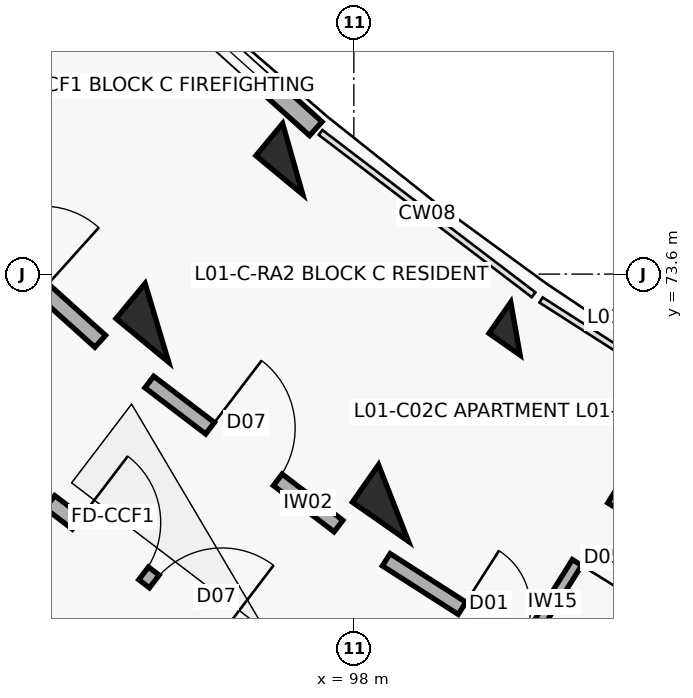
"""IFC4 building model, lengths in metres.
Left out: names, types, materials, properties, quantities, classifications, styles, units other than length and angle.
Written with IfcOpenShell. Run it as: python <this file> out.ifc"""

import sys

from ifc_helpers import new_model, si_unit, direction, frame, frame_2d, origin, origin_2d, place, context, subcontext, project, spatial, rectangle, extrude, element, fill, save


model = new_model("IFC4")
c1 = context("Model", 3, precision=1e-05, world=origin(), true_north=direction((0.0, 1.0)))
c2 = subcontext(c1, "Body", "Model", "MODEL_VIEW")
j1 = project(units=[si_unit("LENGTHUNIT", "METRE"), si_unit("PLANEANGLEUNIT", "RADIAN")], contexts=[c1])
p1 = place(None, origin())
s1 = spatial("IfcSite", under=j1, at=p1, CompositionType="ELEMENT")
p2 = place(p1, origin())
s2 = spatial("IfcBuilding", under=s1, at=p2, CompositionType="ELEMENT")
p3 = place(p2, frame((0.0, 0.0, 4.5)))
s3 = spatial("IfcBuildingStorey", under=s2, at=p3, CompositionType="ELEMENT", Elevation=4.5)
p4 = place(p3, frame((97.195, 75.115, 0.0), z_axis=(0.0, 0.0, 1.0), x_axis=(-0.637961754089, -0.770068049148, 0.0)))
e1 = element("IfcColumn", 1, at=p4, inside=s3, PredefinedType="COLUMN", context=c2, shape_type="SweptSolid", body=[
    extrude(rectangle(XDim=0.55, YDim=0.8, at=origin_2d()), origin(), (0.0, 0.0, 1.0), 3.6),
])
p5 = place(p3, frame((95.409, 72.958, 0.0), z_axis=(0.0, 0.0, 1.0), x_axis=(-0.637961754089, -0.770068049148, 0.0)))
e2 = element("IfcColumn", 2, at=p5, inside=s3, PredefinedType="COLUMN", context=c2, shape_type="SweptSolid", body=[
    extrude(rectangle(XDim=0.6, YDim=0.9, at=origin_2d()), origin(), (0.0, 0.0, 1.0), 3.6),
])
p6 = place(p3, frame((100.126, 72.882, 0.0), z_axis=(0.0, 0.0, 1.0), x_axis=(-0.573004420611, -0.819552276527, 0.0)))
e3 = element("IfcColumn", 3, at=p6, inside=s3, PredefinedType="COLUMN", context=c2, shape_type="SweptSolid", body=[
    extrude(rectangle(XDim=0.5, YDim=0.5, at=origin_2d()), origin(), (0.0, 0.0, 1.0), 3.6),
])
p7 = place(p3, frame((98.522, 70.587, 0.0), z_axis=(0.0, 0.0, 1.0), x_axis=(-0.573004420611, -0.819552276527, 0.0)))
e4 = element("IfcColumn", 4, at=p7, inside=s3, PredefinedType="COLUMN", context=c2, shape_type="SweptSolid", body=[
    extrude(rectangle(XDim=0.6, YDim=0.9, at=origin_2d()), origin(), (0.0, 0.0, 1.0), 3.6),
])
p8 = place(p3, frame((94.82, 77.923, 0.0), z_axis=(0.0, 0.0, 1.0), x_axis=(0.743385092197, -0.668863666751, 0.0)))
e5 = element("IfcWall", 5, at=p8, inside=s3, PredefinedType="SOLIDWALL", context=c2, shape_type="SweptSolid", body=[
    extrude(rectangle(XDim=3.604, YDim=0.245, at=frame_2d((1.802, 0.0))), origin(), (0.0, 0.0, 1.0), 2.6),
])
p9 = place(p8, frame((0.752, 0.0, 0.32)))
e6 = element("IfcOpeningElement", 6, at=p9, cuts=e5, PredefinedType="OPENING", context=c2, shape_type="SweptSolid", body=[
    extrude(rectangle(XDim=2.1, YDim=1.65, at=frame_2d((1.05, 0.825))), frame((0.0, 0.133, 0.0), z_axis=(0.0, -1.0, 0.0), x_axis=(1.0, 0.0, 0.0)), (0.0, 0.0, 1.0), 0.265),
])
p10 = place(p3, frame((92.337, 74.808, 0.0), z_axis=(0.0, 0.0, 1.0), x_axis=(0.743348465558, -0.668904371904, 0.0)))
e7 = element("IfcWall", 7, at=p10, inside=s3, PredefinedType="SOLIDWALL", context=c2, shape_type="SweptSolid", body=[
    extrude(rectangle(XDim=3.129, YDim=0.21, at=frame_2d((1.564, 0.0))), origin(), (0.0, 0.0, 1.0), 2.58),
])
p11 = place(p10, frame((1.014, 0.0, 0.0)))
e8 = element("IfcOpeningElement", 8, at=p11, cuts=e7, PredefinedType="OPENING", context=c2, shape_type="SweptSolid", body=[
    extrude(rectangle(XDim=1.1, YDim=2.15, at=frame_2d((0.55, 1.075))), frame((0.0, 0.115, 0.0), z_axis=(0.0, -1.0, 0.0), x_axis=(1.0, 0.0, 0.0)), (0.0, 0.0, 1.0), 0.23),
])
p12 = place(p3, frame((94.001, 70.602, 0.0), z_axis=(0.0, 0.0, 1.0), x_axis=(0.795498026433, -0.605956178235, 0.0)))
e9 = element("IfcWall", 9, at=p12, inside=s3, PredefinedType="SOLIDWALL", context=c2, shape_type="SweptSolid", body=[
    extrude(rectangle(XDim=3.296, YDim=0.21, at=frame_2d((1.648, 0.0))), origin(), (0.0, 0.0, 1.0), 2.58),
])
p13 = place(p12, frame((0.45, 0.0, 0.0)))
e10 = element("IfcOpeningElement", 10, at=p13, cuts=e9, PredefinedType="OPENING", context=c2, shape_type="SweptSolid", body=[
    extrude(rectangle(XDim=1.1, YDim=2.15, at=frame_2d((0.55, 1.075))), frame((0.0, 0.115, 0.0), z_axis=(0.0, -1.0, 0.0), x_axis=(1.0, 0.0, 0.0)), (0.0, 0.0, 1.0), 0.23),
])
p14 = place(p12, frame((1.726, 0.0, 0.0)))
e11 = element("IfcOpeningElement", 11, at=p14, cuts=e9, PredefinedType="OPENING", context=c2, shape_type="SweptSolid", body=[
    extrude(rectangle(XDim=1.12, YDim=2.15, at=frame_2d((0.56, 1.075))), frame((0.0, 0.115, 0.0), z_axis=(0.0, -1.0, 0.0), x_axis=(1.0, 0.0, 0.0)), (0.0, 0.0, 1.0), 0.23),
])
p15 = place(p3, frame((95.309, 72.18, 0.0), z_axis=(0.0, 0.0, 1.0), x_axis=(0.795463961918, -0.606000895453, 0.0)))
e12 = element("IfcWall", 12, at=p15, inside=s3, PredefinedType="SOLIDWALL", context=c2, shape_type="SweptSolid", body=[
    extrude(rectangle(XDim=3.129, YDim=0.19, at=frame_2d((1.564, 0.0))), origin(), (0.0, 0.0, 1.0), 2.58),
])
p16 = place(p15, frame((1.004, 0.0, 0.0)))
e13 = element("IfcOpeningElement", 13, at=p16, cuts=e12, PredefinedType="OPENING", context=c2, shape_type="SweptSolid", body=[
    extrude(rectangle(XDim=1.12, YDim=2.15, at=frame_2d((0.56, 1.075))), frame((0.0, 0.105, 0.0), z_axis=(0.0, -1.0, 0.0), x_axis=(1.0, 0.0, 0.0)), (0.0, 0.0, 1.0), 0.21),
])
p17 = place(p3, frame((98.427, 69.841, 0.0), z_axis=(0.0, 0.0, 1.0), x_axis=(0.842280895761, -0.539038860043, 0.0)))
e14 = element("IfcWall", 14, at=p17, inside=s3, PredefinedType="SOLIDWALL", context=c2, shape_type="SweptSolid", body=[
    extrude(rectangle(XDim=3.269, YDim=0.19, at=frame_2d((1.634, 0.0))), origin(), (0.0, 0.0, 1.0), 2.58),
])
p18 = place(p17, frame((1.184, 0.0, 0.0)))
e15 = element("IfcOpeningElement", 15, at=p18, cuts=e14, PredefinedType="OPENING", context=c2, shape_type="SweptSolid", body=[
    extrude(rectangle(XDim=0.9, YDim=2.1, at=frame_2d((0.45, 1.05))), frame((0.0, 0.105, 0.0), z_axis=(0.0, -1.0, 0.0), x_axis=(1.0, 0.0, 0.0)), (0.0, 0.0, 1.0), 0.21),
])
p19 = place(p3, frame((102.044, 71.577, 0.0), z_axis=(0.0, 0.0, 1.0), x_axis=(-0.53015188203, -0.847902696057, 0.0)))
e16 = element("IfcWall", 16, at=p19, inside=s3, PredefinedType="PARTITIONING", context=c2, shape_type="SweptSolid", body=[
    extrude(rectangle(XDim=3.3, YDim=0.145, at=frame_2d((1.65, 0.0))), origin(), (0.0, 0.0, 1.0), 2.58),
])
p20 = place(p19, frame((1.21, 0.0, 0.0)))
e17 = element("IfcOpeningElement", 17, at=p20, cuts=e16, PredefinedType="OPENING", context=c2, shape_type="SweptSolid", body=[
    extrude(rectangle(XDim=0.88, YDim=2.1, at=frame_2d((0.44, 1.05))), frame((0.0, 0.083, 0.0), z_axis=(0.0, -1.0, 0.0), x_axis=(1.0, 0.0, 0.0)), (0.0, 0.0, 1.0), 0.165),
])
p21 = place(p9, origin())
e18 = element("IfcWindow", 18, at=p21, inside=s3, PartitioningType="TRIPLE_PANEL_VERTICAL", PredefinedType="WINDOW", context=c2, shape_type="SweptSolid", body=[
    extrude(rectangle(XDim=2.1, YDim=1.65, at=frame_2d((1.05, 0.825))), frame((0.0, 0.03, 0.0), z_axis=(0.0, -1.0, 0.0), x_axis=(1.0, 0.0, 0.0)), (0.0, 0.0, 1.0), 0.06),
])
fill(e6, e18)
p22 = place(p13, origin())
e19 = element("IfcDoor", 19, at=p22, inside=s3, OperationType="SINGLE_SWING_LEFT", PredefinedType="DOOR", context=c2, shape_type="SweptSolid", body=[
    extrude(rectangle(XDim=1.1, YDim=2.15, at=frame_2d((0.55, 1.075))), frame((0.0, 0.025, 0.0), z_axis=(0.0, -1.0, 0.0), x_axis=(1.0, 0.0, 0.0)), (0.0, 0.0, 1.0), 0.05),
])
fill(e10, e19)
p23 = place(p14, origin())
e20 = element("IfcDoor", 20, at=p23, inside=s3, OperationType="SINGLE_SWING_RIGHT", PredefinedType="DOOR", context=c2, shape_type="SweptSolid", body=[
    extrude(rectangle(XDim=1.12, YDim=2.15, at=frame_2d((0.56, 1.075))), frame((0.0, 0.025, 0.0), z_axis=(0.0, -1.0, 0.0), x_axis=(1.0, 0.0, 0.0)), (0.0, 0.0, 1.0), 0.05),
])
fill(e11, e20)
p24 = place(p16, origin())
e21 = element("IfcDoor", 21, at=p24, inside=s3, OperationType="SINGLE_SWING_LEFT", PredefinedType="DOOR", context=c2, shape_type="SweptSolid", body=[
    extrude(rectangle(XDim=1.12, YDim=2.15, at=frame_2d((0.56, 1.075))), frame((0.0, 0.025, 0.0), z_axis=(0.0, -1.0, 0.0), x_axis=(1.0, 0.0, 0.0)), (0.0, 0.0, 1.0), 0.05),
])
fill(e13, e21)
p25 = place(p18, origin())
e22 = element("IfcDoor", 22, at=p25, inside=s3, OperationType="SINGLE_SWING_LEFT", PredefinedType="DOOR", context=c2, shape_type="SweptSolid", body=[
    extrude(rectangle(XDim=0.9, YDim=2.1, at=frame_2d((0.45, 1.05))), frame((0.0, 0.025, 0.0), z_axis=(0.0, -1.0, 0.0), x_axis=(1.0, 0.0, 0.0)), (0.0, 0.0, 1.0), 0.05),
])
fill(e15, e22)
p26 = place(p20, origin())
e23 = element("IfcDoor", 23, at=p26, inside=s3, OperationType="SINGLE_SWING_RIGHT", PredefinedType="DOOR", context=c2, shape_type="SweptSolid", body=[
    extrude(rectangle(XDim=0.88, YDim=2.1, at=frame_2d((0.44, 1.05))), frame((0.0, 0.025, 0.0), z_axis=(0.0, -1.0, 0.0), x_axis=(1.0, 0.0, 0.0)), (0.0, 0.0, 1.0), 0.05),
])
fill(e17, e23)
save(model, sys.argv[1])
